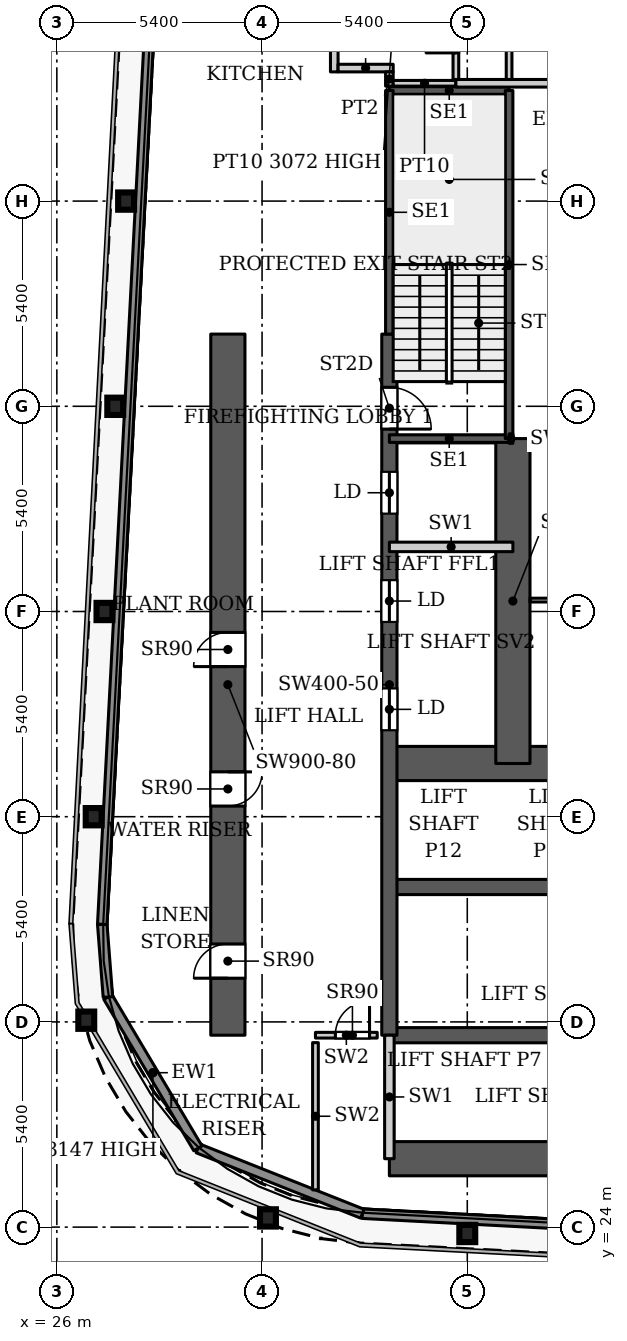
"""IFC4 building model, lengths in metres.
Left out: names, types, materials, properties, quantities, classifications, styles, units other than length and angle.
Written with IfcOpenShell. Run it as: python <this file> out.ifc"""

import sys

from ifc_helpers import new_model, si_unit, direction, frame, frame_2d, origin, origin_2d, place, context, subcontext, project, spatial, rectangle, i_section, extrude, source, transform, mapped, element, fill, save


model = new_model("IFC4")
c1 = context("Model", 3, precision=1e-05, world=origin(), true_north=direction((0.0, 1.0)))
c2 = subcontext(c1, "Body", "Model", "MODEL_VIEW")
j1 = project(units=[si_unit("LENGTHUNIT", "METRE"), si_unit("PLANEANGLEUNIT", "RADIAN")], contexts=[c1])
p1 = place(None, origin())
s1 = spatial("IfcSite", under=j1, at=p1, CompositionType="ELEMENT")
p2 = place(p1, origin())
s2 = spatial("IfcBuilding", under=s1, at=p2, CompositionType="ELEMENT")
p3 = place(p2, frame((0.0, 0.0, 94.1)))
s3 = spatial("IfcBuildingStorey", under=s2, at=p3, CompositionType="ELEMENT", Elevation=94.1)
for number, where, z_axis, x_axis in (
    (1, (36.8, 23.832, 0.0), (0.0, 0.0, 1.0), (1.0, 0.0, 0.0)),
    (2, (31.555, 24.242, 0.0), (0.0, 0.0, 1.0), (1.0, 0.0, 0.0)),
    (3, (26.774, 29.445, 0.0), (0.0, 0.0, 1.0), (1.0, 0.0, 0.0)),
    (4, (26.969, 34.8, 0.0), (0.0, 0.0, 1.0), (1.0, 0.0, 0.0)),
    (5, (27.253, 40.2, 0.0), (0.0, 0.0, 1.0), (1.0, 0.0, 0.0)),
    (6, (27.537, 45.6, 0.0), (0.0, 0.0, 1.0), (1.0, 0.0, 0.0)),
    (7, (27.822, 51.0, 0.0), (0.0, 0.0, 1.0), (1.0, 0.0, 0.0)),
):
    element("IfcColumn", number, at=place(p3, frame(where, z_axis=z_axis, x_axis=x_axis)), inside=s3, PredefinedType="COLUMN", context=c2, shape_type="SweptSolid", body=[
        extrude(i_section(OverallWidth=0.418, OverallDepth=0.455, WebThickness=0.042, FlangeThickness=0.068, FilletRadius=0.014, at=origin_2d()), origin(), (0.0, 0.0, 1.0), 3.9),
    ])
p4 = place(p3, frame((34.75, 25.8, 0.0), z_axis=(0.0, 0.0, 1.0), x_axis=(1.0, 0.0, 0.0)))
e8 = element("IfcWall", 8, at=p4, inside=s3, PredefinedType="SHEAR", context=c2, shape_type="SweptSolid", body=[
    extrude(rectangle(XDim=18.4, YDim=0.9, at=frame_2d((9.2, 0.0))), origin(), (0.0, 0.0, 1.0), 3.9),
])
p5 = place(p3, frame((34.75, 29.05, 0.0), z_axis=(0.0, 0.0, 1.0), x_axis=(1.0, 0.0, 0.0)))
e9 = element("IfcWall", 9, at=p5, inside=s3, PredefinedType="SHEAR", context=c2, shape_type="SweptSolid", body=[
    extrude(rectangle(XDim=18.4, YDim=0.4, at=frame_2d((9.2, 0.0))), origin(), (0.0, 0.0, 1.0), 3.9),
])
p6 = place(p5, frame((15.125, 0.0, 0.0)))
e10 = element("IfcOpeningElement", 10, at=p6, cuts=e9, PredefinedType="OPENING", context=c2, shape_type="SweptSolid", body=[
    extrude(rectangle(XDim=1.1, YDim=2.2, at=frame_2d((0.55, 1.1))), frame((0.0, 0.21, 0.0), z_axis=(0.0, -1.0, 0.0), x_axis=(1.0, 0.0, 0.0)), (0.0, 0.0, 1.0), 0.42),
])
p7 = place(p3, frame((34.75, 32.95, 0.0), z_axis=(0.0, 0.0, 1.0), x_axis=(1.0, 0.0, 0.0)))
e11 = element("IfcWall", 11, at=p7, inside=s3, PredefinedType="SHEAR", context=c2, shape_type="SweptSolid", body=[
    extrude(rectangle(XDim=14.25, YDim=0.4, at=frame_2d((7.125, 0.0))), origin(), (0.0, 0.0, 1.0), 3.9),
])
p8 = place(p3, frame((34.75, 36.2, 0.0), z_axis=(0.0, 0.0, 1.0), x_axis=(1.0, 0.0, 0.0)))
e12 = element("IfcWall", 12, at=p8, inside=s3, PredefinedType="SHEAR", context=c2, shape_type="SweptSolid", body=[
    extrude(rectangle(XDim=18.4, YDim=0.9, at=frame_2d((9.2, 0.0))), origin(), (0.0, 0.0, 1.0), 3.9),
])
p9 = place(p8, frame((16.9, 0.0, 0.0)))
e13 = element("IfcOpeningElement", 13, at=p9, cuts=e12, PredefinedType="OPENING", context=c2, shape_type="SweptSolid", body=[
    extrude(rectangle(XDim=1.0, YDim=2.2, at=frame_2d((0.5, 1.1))), frame((0.0, 0.46, 0.0), z_axis=(0.0, -1.0, 0.0), x_axis=(1.0, 0.0, 0.0)), (0.0, 0.0, 1.0), 0.92),
])
p10 = place(p3, frame((34.75, 29.05, 0.0), z_axis=(0.0, 0.0, 1.0), x_axis=(0.0, 1.0, 0.0)))
e14 = element("IfcWall", 14, at=p10, inside=s3, PredefinedType="SHEAR", context=c2, shape_type="SweptSolid", body=[
    extrude(rectangle(XDim=18.45, YDim=0.4, at=frame_2d((9.225, 0.0))), origin(), (0.0, 0.0, 1.0), 3.9),
])
p11 = place(p10, frame((8.025, 0.0, 0.0)))
e15 = element("IfcOpeningElement", 15, at=p11, cuts=e14, PredefinedType="OPENING", context=c2, shape_type="SweptSolid", body=[
    extrude(rectangle(XDim=1.1, YDim=2.2, at=frame_2d((0.55, 1.1))), frame((0.0, 0.21, 0.0), z_axis=(0.0, -1.0, 0.0), x_axis=(1.0, 0.0, 0.0)), (0.0, 0.0, 1.0), 0.42),
])
p12 = place(p10, frame((10.875, 0.0, 0.0)))
e16 = element("IfcOpeningElement", 16, at=p12, cuts=e14, PredefinedType="OPENING", context=c2, shape_type="SweptSolid", body=[
    extrude(rectangle(XDim=1.1, YDim=2.2, at=frame_2d((0.55, 1.1))), frame((0.0, 0.21, 0.0), z_axis=(0.0, -1.0, 0.0), x_axis=(1.0, 0.0, 0.0)), (0.0, 0.0, 1.0), 0.42),
])
p13 = place(p10, frame((13.725, 0.0, 0.0)))
e17 = element("IfcOpeningElement", 17, at=p13, cuts=e14, PredefinedType="OPENING", context=c2, shape_type="SweptSolid", body=[
    extrude(rectangle(XDim=1.1, YDim=2.2, at=frame_2d((0.55, 1.1))), frame((0.0, 0.21, 0.0), z_axis=(0.0, -1.0, 0.0), x_axis=(1.0, 0.0, 0.0)), (0.0, 0.0, 1.0), 0.42),
])
p14 = place(p10, frame((15.95, 0.0, 0.0)))
e18 = element("IfcOpeningElement", 18, at=p14, cuts=e14, PredefinedType="OPENING", context=c2, shape_type="SweptSolid", body=[
    extrude(rectangle(XDim=1.1, YDim=2.2, at=frame_2d((0.55, 1.1))), frame((0.0, 0.21, 0.0), z_axis=(0.0, -1.0, 0.0), x_axis=(1.0, 0.0, 0.0)), (0.0, 0.0, 1.0), 0.42),
])
p15 = place(p3, frame((38.0, 36.2, 0.0), z_axis=(0.0, 0.0, 1.0), x_axis=(0.0, 1.0, 0.0)))
e19 = element("IfcWall", 19, at=p15, inside=s3, PredefinedType="SHEAR", context=c2, shape_type="SweptSolid", body=[
    extrude(rectangle(XDim=8.55, YDim=0.9, at=frame_2d((4.275, 0.0))), origin(), (0.0, 0.0, 1.0), 3.9),
])
p16 = place(p3, frame((30.5, 29.05, 0.0), z_axis=(0.0, 0.0, 1.0), x_axis=(0.0, 1.0, 0.0)))
e20 = element("IfcWall", 20, at=p16, inside=s3, PredefinedType="SHEAR", context=c2, shape_type="SweptSolid", body=[
    extrude(rectangle(XDim=18.45, YDim=0.9, at=frame_2d((9.225, 0.0))), origin(), (0.0, 0.0, 1.0), 3.9),
])
p17 = place(p16, frame((1.5, 0.0, 0.0)))
e21 = element("IfcOpeningElement", 21, at=p17, cuts=e20, PredefinedType="OPENING", context=c2, shape_type="SweptSolid", body=[
    extrude(rectangle(XDim=0.9, YDim=2.2, at=frame_2d((0.45, 1.1))), frame((0.0, 0.46, 0.0), z_axis=(0.0, -1.0, 0.0), x_axis=(1.0, 0.0, 0.0)), (0.0, 0.0, 1.0), 0.92),
])
p18 = place(p16, frame((6.03, 0.0, 0.0)))
e22 = element("IfcOpeningElement", 22, at=p18, cuts=e20, PredefinedType="OPENING", context=c2, shape_type="SweptSolid", body=[
    extrude(rectangle(XDim=0.9, YDim=2.2, at=frame_2d((0.45, 1.1))), frame((0.0, 0.46, 0.0), z_axis=(0.0, -1.0, 0.0), x_axis=(1.0, 0.0, 0.0)), (0.0, 0.0, 1.0), 0.92),
])
p19 = place(p16, frame((9.7, 0.0, 0.0)))
e23 = element("IfcOpeningElement", 23, at=p19, cuts=e20, PredefinedType="OPENING", context=c2, shape_type="SweptSolid", body=[
    extrude(rectangle(XDim=0.9, YDim=2.2, at=frame_2d((0.45, 1.1))), frame((0.0, 0.46, 0.0), z_axis=(0.0, -1.0, 0.0), x_axis=(1.0, 0.0, 0.0)), (0.0, 0.0, 1.0), 0.92),
])
p20 = place(p3, frame((100.586, 20.85, 0.0), z_axis=(0.0, 0.0, 1.0), x_axis=(-0.99861746497, 0.052565755559, 0.0)))
e24 = element("IfcWall", 24, at=p20, inside=s3, PredefinedType="SOLIDWALL", context=c2, shape_type="SweptSolid", body=[
    extrude(rectangle(XDim=66.639, YDim=0.25, at=frame_2d((33.319, 0.0))), origin(), (0.0, 0.0, 1.0), 3.75),
])
p21 = place(p3, frame((34.039, 24.353, 0.0), z_axis=(0.0, 0.0, 1.0), x_axis=(-0.929352825399, 0.369192803184, 0.0)))
e25 = element("IfcWall", 25, at=p21, inside=s3, PredefinedType="SOLIDWALL", context=c2, shape_type="SweptSolid", body=[
    extrude(rectangle(XDim=4.656, YDim=0.25, at=frame_2d((2.328, 0.0))), origin(), (0.0, 0.0, 1.0), 3.75),
])
p22 = place(p3, frame((29.712, 26.072, 0.0), z_axis=(0.0, 0.0, 1.0), x_axis=(-0.511028049012, 0.859564036662, 0.0)))
e26 = element("IfcWall", 26, at=p22, inside=s3, PredefinedType="SOLIDWALL", context=c2, shape_type="SweptSolid", body=[
    extrude(rectangle(XDim=4.634, YDim=0.25, at=frame_2d((2.317, 0.0))), origin(), (0.0, 0.0, 1.0), 3.147),
])
p23 = place(p3, frame((27.344, 30.055, 0.0), z_axis=(0.0, 0.0, 1.0), x_axis=(-0.077571675317, 0.99698677784, 0.0)))
e27 = element("IfcWall", 27, at=p23, inside=s3, PredefinedType="SOLIDWALL", context=c2, shape_type="SweptSolid", body=[
    extrude(rectangle(XDim=1.92, YDim=0.25, at=frame_2d((0.96, 0.0))), origin(), (0.0, 0.0, 1.0), 3.75),
])
p24 = place(p3, frame((27.195, 31.969, 0.0), z_axis=(0.0, 0.0, 1.0), x_axis=(0.052559748861, 0.998617781135, 0.0)))
e28 = element("IfcWall", 28, at=p24, inside=s3, PredefinedType="SOLIDWALL", context=c2, shape_type="SweptSolid", body=[
    extrude(rectangle(XDim=55.972, YDim=0.25, at=frame_2d((27.986, 0.0))), origin(), (0.0, 0.0, 1.0), 3.75),
])
for number, where, z_axis, x_axis in (
    (29, (34.75, 44.75, 0.0), (0.0, 0.0, 1.0), (1.0, 0.0, 0.0)),
    (30, (34.75, 53.91, 0.0), (0.0, 0.0, 1.0), (1.0, 0.0, 0.0)),
):
    element("IfcWall", number, at=place(p3, frame(where, z_axis=z_axis, x_axis=x_axis)), inside=s3, PredefinedType="SHEAR", context=c2, shape_type="SweptSolid", body=[
        extrude(rectangle(XDim=3.15, YDim=0.2, at=frame_2d((1.575, 0.0))), origin(), (0.0, 0.0, 1.0), 3.9),
    ])
p25 = place(p3, frame((34.75, 47.5, 0.0), z_axis=(0.0, 0.0, 1.0), x_axis=(0.0, 1.0, 0.0)))
e31 = element("IfcWall", 31, at=p25, inside=s3, PredefinedType="SHEAR", context=c2, shape_type="SweptSolid", body=[
    extrude(rectangle(XDim=6.41, YDim=0.2, at=frame_2d((3.205, 0.0))), origin(), (0.0, 0.0, 1.0), 3.9),
])
p26 = place(p3, frame((37.9, 44.75, 0.0), z_axis=(0.0, 0.0, 1.0), x_axis=(0.0, 1.0, 0.0)))
e32 = element("IfcWall", 32, at=p26, inside=s3, PredefinedType="SHEAR", context=c2, shape_type="SweptSolid", body=[
    extrude(rectangle(XDim=9.16, YDim=0.2, at=frame_2d((4.58, 0.0))), origin(), (0.0, 0.0, 1.0), 3.9),
])
for number, where, z_axis, x_axis in (
    (33, (34.75, 25.8, 0.0), (0.0, 0.0, 1.0), (0.0, 1.0, 0.0)),
    (34, (34.75, 41.9, 0.0), (0.0, 0.0, 1.0), (1.0, 0.0, 0.0)),
):
    element("IfcWall", number, at=place(p3, frame(where, z_axis=z_axis, x_axis=x_axis)), inside=s3, PredefinedType="PARTITIONING", context=c2, shape_type="SweptSolid", body=[
        extrude(rectangle(XDim=3.25, YDim=0.25, at=frame_2d((1.625, 0.0))), origin(), (0.0, 0.0, 1.0), 3.9),
    ])
p27 = place(p3, frame((37.9, 44.75, 0.0), z_axis=(0.0, 0.0, 1.0), x_axis=(1.0, 0.0, 0.0)))
e35 = element("IfcWall", 35, at=p27, inside=s3, PredefinedType="PARTITIONING", context=c2, shape_type="SweptSolid", body=[
    extrude(rectangle(XDim=0.1, YDim=0.25, at=frame_2d((0.05, 0.0))), origin(), (0.0, 0.0, 1.0), 3.9),
])
p28 = place(p3, frame((32.805, 29.05, 0.0), z_axis=(0.0, 0.0, 1.0), x_axis=(1.0, 0.0, 0.0)))
e36 = element("IfcWall", 36, at=p28, inside=s3, PredefinedType="PARTITIONING", context=c2, shape_type="SweptSolid", body=[
    extrude(rectangle(XDim=1.625, YDim=0.15, at=frame_2d((0.812, 0.0))), origin(), (0.0, 0.0, 1.0), 3.9),
])
p29 = place(p28, frame((0.523, 0.0, 0.0)))
e37 = element("IfcOpeningElement", 37, at=p29, cuts=e36, PredefinedType="OPENING", context=c2, shape_type="SweptSolid", body=[
    extrude(rectangle(XDim=0.9, YDim=2.2, at=frame_2d((0.45, 1.1))), frame((0.0, 0.085, 0.0), z_axis=(0.0, -1.0, 0.0), x_axis=(1.0, 0.0, 0.0)), (0.0, 0.0, 1.0), 0.17),
])
p30 = place(p3, frame((32.805, 24.98, 0.0), z_axis=(0.0, 0.0, 1.0), x_axis=(0.0, 1.0, 0.0)))
e38 = element("IfcWall", 38, at=p30, inside=s3, PredefinedType="PARTITIONING", context=c2, shape_type="SweptSolid", body=[
    extrude(rectangle(XDim=3.875, YDim=0.15, at=frame_2d((1.938, 0.0))), origin(), (0.0, 0.0, 1.0), 3.9),
])
p31 = place(p3, frame((33.3, 54.4, 0.0), z_axis=(0.0, 0.0, 1.0), x_axis=(0.0, 1.0, 0.0)))
e39 = element("IfcWall", 39, at=p31, inside=s3, PredefinedType="PARTITIONING", context=c2, shape_type="SweptSolid", body=[
    extrude(rectangle(XDim=24.95, YDim=0.2, at=frame_2d((12.475, 0.0))), origin(), (0.0, 0.0, 1.0), 3.6),
])
p32 = place(p31, frame((5.5, 0.0, 0.0)))
e40 = element("IfcOpeningElement", 40, at=p32, cuts=e39, PredefinedType="OPENING", context=c2, shape_type="SweptSolid", body=[
    extrude(rectangle(XDim=1.0, YDim=2.1, at=frame_2d((0.5, 1.05))), frame((0.0, 0.11, 0.0), z_axis=(0.0, -1.0, 0.0), x_axis=(1.0, 0.0, 0.0)), (0.0, 0.0, 1.0), 0.22),
])
p33 = place(p31, frame((22.3, 0.0, 0.0)))
e41 = element("IfcOpeningElement", 41, at=p33, cuts=e39, PredefinedType="OPENING", context=c2, shape_type="SweptSolid", body=[
    extrude(rectangle(XDim=1.0, YDim=2.1, at=frame_2d((0.5, 1.05))), frame((0.0, 0.11, 0.0), z_axis=(0.0, -1.0, 0.0), x_axis=(1.0, 0.0, 0.0)), (0.0, 0.0, 1.0), 0.22),
])
p34 = place(p3, frame((33.4, 54.5, 0.0), z_axis=(0.0, 0.0, 1.0), x_axis=(1.0, 0.0, 0.0)))
e42 = element("IfcWall", 42, at=p34, inside=s3, PredefinedType="PARTITIONING", context=c2, shape_type="SweptSolid", body=[
    extrude(rectangle(XDim=1.45, YDim=0.2, at=frame_2d((0.725, 0.0))), origin(), (0.0, 0.0, 1.0), 3.6),
])
p35 = place(p3, frame((34.75, 54.025, 0.0), z_axis=(0.0, 0.0, 1.0), x_axis=(0.0, 1.0, 0.0)))
e43 = element("IfcWall", 43, at=p35, inside=s3, PredefinedType="PARTITIONING", context=c2, shape_type="SweptSolid", body=[
    extrude(rectangle(XDim=0.375, YDim=0.2, at=frame_2d((0.188, 0.0))), origin(), (0.0, 0.0, 1.0), 3.6),
])
p36 = place(p3, frame((34.85, 54.1, 0.0), z_axis=(0.0, 0.0, 1.0), x_axis=(1.0, 0.0, 0.0)))
e44 = element("IfcWall", 44, at=p36, inside=s3, PredefinedType="PARTITIONING", context=c2, shape_type="SweptSolid", body=[
    extrude(rectangle(XDim=1.65, YDim=0.15, at=frame_2d((0.825, 0.0))), origin(), (0.0, 0.0, 1.0), 3.6),
])
p37 = place(p3, frame((36.5, 54.1, 0.0), z_axis=(0.0, 0.0, 1.0), x_axis=(1.0, 0.0, 0.0)))
e45 = element("IfcWall", 45, at=p37, inside=s3, PredefinedType="PARTITIONING", context=c2, shape_type="SweptSolid", body=[
    extrude(rectangle(XDim=9.4, YDim=0.2, at=frame_2d((4.7, 0.0))), origin(), (0.0, 0.0, 1.0), 3.6),
])
p38 = place(p3, frame((36.5, 54.2, 0.0), z_axis=(0.0, 0.0, 1.0), x_axis=(0.0, 1.0, 0.0)))
e46 = element("IfcWall", 46, at=p38, inside=s3, PredefinedType="PARTITIONING", context=c2, shape_type="SweptSolid", body=[
    extrude(rectangle(XDim=5.35, YDim=0.15, at=frame_2d((2.675, 0.0))), origin(), (0.0, 0.0, 1.0), 3.6),
])
p39 = place(p38, frame((0.7, 0.0, 0.0)))
e47 = element("IfcOpeningElement", 47, at=p39, cuts=e46, PredefinedType="OPENING", context=c2, shape_type="SweptSolid", body=[
    extrude(rectangle(XDim=0.8, YDim=2.1, at=frame_2d((0.4, 1.05))), frame((0.0, 0.085, 0.0), z_axis=(0.0, -1.0, 0.0), x_axis=(1.0, 0.0, 0.0)), (0.0, 0.0, 1.0), 0.17),
])
p40 = place(p38, frame((3.35, 0.0, 0.0)))
e48 = element("IfcOpeningElement", 48, at=p40, cuts=e46, PredefinedType="OPENING", context=c2, shape_type="SweptSolid", body=[
    extrude(rectangle(XDim=0.9, YDim=2.1, at=frame_2d((0.45, 1.05))), frame((0.0, 0.085, 0.0), z_axis=(0.0, -1.0, 0.0), x_axis=(1.0, 0.0, 0.0)), (0.0, 0.0, 1.0), 0.17),
])
p41 = place(p3, frame((37.9, 54.2, 0.0), z_axis=(0.0, 0.0, 1.0), x_axis=(0.0, 1.0, 0.0)))
e49 = element("IfcWall", 49, at=p41, inside=s3, PredefinedType="PARTITIONING", context=c2, shape_type="SweptSolid", body=[
    extrude(rectangle(XDim=8.5, YDim=0.15, at=frame_2d((4.25, 0.0))), origin(), (0.0, 0.0, 1.0), 3.6),
])
p42 = place(p41, frame((1.1, 0.0, 0.0)))
e50 = element("IfcOpeningElement", 50, at=p42, cuts=e49, PredefinedType="OPENING", context=c2, shape_type="SweptSolid", body=[
    extrude(rectangle(XDim=0.9, YDim=2.1, at=frame_2d((0.45, 1.05))), frame((0.0, 0.085, 0.0), z_axis=(0.0, -1.0, 0.0), x_axis=(1.0, 0.0, 0.0)), (0.0, 0.0, 1.0), 0.17),
])
p43 = place(p41, frame((5.4, 0.0, 0.0)))
e51 = element("IfcOpeningElement", 51, at=p43, cuts=e49, PredefinedType="OPENING", context=c2, shape_type="SweptSolid", body=[
    extrude(rectangle(XDim=1.0, YDim=2.1, at=frame_2d((0.5, 1.05))), frame((0.0, 0.085, 0.0), z_axis=(0.0, -1.0, 0.0), x_axis=(1.0, 0.0, 0.0)), (0.0, 0.0, 1.0), 0.17),
])
p44 = place(p3, frame((38.449, 40.5, 0.0), z_axis=(0.0, 0.0, 1.0), x_axis=(1.0, 0.0, 0.0)))
e52 = element("IfcWall", 52, at=p44, inside=s3, PredefinedType="PARTITIONING", context=c2, shape_type="SweptSolid", body=[
    extrude(rectangle(XDim=14.851, YDim=0.1, at=frame_2d((7.426, 0.0))), origin(), (0.0, 0.0, 1.0), 3.6),
])
p45 = place(p44, frame((6.751, 0.0, 0.0)))
e53 = element("IfcOpeningElement", 53, at=p45, cuts=e52, PredefinedType="OPENING", context=c2, shape_type="SweptSolid", body=[
    extrude(rectangle(XDim=1.0, YDim=2.1, at=frame_2d((0.5, 1.05))), frame((0.0, 0.06, 0.0), z_axis=(0.0, -1.0, 0.0), x_axis=(1.0, 0.0, 0.0)), (0.0, 0.0, 1.0), 0.12),
])
m1 = source(origin(), c2, "Body", "SweptSolid", [
    extrude(rectangle(XDim=1.1, YDim=2.2, at=frame_2d((0.55, 1.1))), frame((0.0, 0.025, 0.0), z_axis=(0.0, -1.0, 0.0), x_axis=(1.0, 0.0, 0.0)), (0.0, 0.0, 1.0), 0.05),
])
p46 = place(p11, origin())
e54 = element("IfcDoor", 54, at=p46, inside=s3, OperationType="SLIDING_TO_LEFT", PredefinedType="DOOR", context=c2, shape_type="MappedRepresentation", body=[
    mapped(m1, transform((0.0, 0.0, 0.0), x_axis=(1.0, 0.0, 0.0), y_axis=(0.0, 1.0, 0.0), z_axis=(0.0, 0.0, 1.0), scale=1.0)),
])
fill(e15, e54)
p47 = place(p12, origin())
e55 = element("IfcDoor", 55, at=p47, inside=s3, OperationType="SLIDING_TO_LEFT", PredefinedType="DOOR", context=c2, shape_type="MappedRepresentation", body=[
    mapped(m1, transform((0.0, 0.0, 0.0), x_axis=(1.0, 0.0, 0.0), y_axis=(0.0, 1.0, 0.0), z_axis=(0.0, 0.0, 1.0), scale=1.0)),
])
fill(e16, e55)
p48 = place(p13, origin())
e56 = element("IfcDoor", 56, at=p48, inside=s3, OperationType="SLIDING_TO_LEFT", PredefinedType="DOOR", context=c2, shape_type="MappedRepresentation", body=[
    mapped(m1, transform((0.0, 0.0, 0.0), x_axis=(1.0, 0.0, 0.0), y_axis=(0.0, 1.0, 0.0), z_axis=(0.0, 0.0, 1.0), scale=1.0)),
])
fill(e17, e56)
m2 = source(origin(), c2, "Body", "SweptSolid", [
    extrude(rectangle(XDim=0.9, YDim=2.2, at=frame_2d((0.45, 1.1))), frame((0.0, 0.025, 0.0), z_axis=(0.0, -1.0, 0.0), x_axis=(1.0, 0.0, 0.0)), (0.0, 0.0, 1.0), 0.05),
])
p49 = place(p17, origin())
e57 = element("IfcDoor", 57, at=p49, inside=s3, OperationType="SINGLE_SWING_LEFT", PredefinedType="DOOR", context=c2, shape_type="MappedRepresentation", body=[
    mapped(m2, transform((0.0, 0.0, 0.0), x_axis=(1.0, 0.0, 0.0), y_axis=(0.0, 1.0, 0.0), z_axis=(0.0, 0.0, 1.0), scale=1.0)),
])
fill(e21, e57)
p50 = place(p18, origin())
e58 = element("IfcDoor", 58, at=p50, inside=s3, OperationType="SINGLE_SWING_RIGHT", PredefinedType="DOOR", context=c2, shape_type="MappedRepresentation", body=[
    mapped(m2, transform((0.0, 0.0, 0.0), x_axis=(1.0, 0.0, 0.0), y_axis=(0.0, 1.0, 0.0), z_axis=(0.0, 0.0, 1.0), scale=1.0)),
])
fill(e22, e58)
p51 = place(p19, origin())
e59 = element("IfcDoor", 59, at=p51, inside=s3, OperationType="SINGLE_SWING_LEFT", PredefinedType="DOOR", context=c2, shape_type="MappedRepresentation", body=[
    mapped(m2, transform((0.0, 0.0, 0.0), x_axis=(1.0, 0.0, 0.0), y_axis=(0.0, 1.0, 0.0), z_axis=(0.0, 0.0, 1.0), scale=1.0)),
])
fill(e23, e59)
p52 = place(p29, origin())
e60 = element("IfcDoor", 60, at=p52, inside=s3, OperationType="SINGLE_SWING_LEFT", PredefinedType="DOOR", context=c2, shape_type="MappedRepresentation", body=[
    mapped(m2, transform((0.0, 0.0, 0.0), x_axis=(1.0, 0.0, 0.0), y_axis=(0.0, 1.0, 0.0), z_axis=(0.0, 0.0, 1.0), scale=1.0)),
])
fill(e37, e60)
m3 = source(origin(), c2, "Body", "SweptSolid", [
    extrude(rectangle(XDim=1.1, YDim=2.2, at=frame_2d((0.55, 1.1))), frame((0.0, 0.025, 0.0), z_axis=(0.0, -1.0, 0.0), x_axis=(1.0, 0.0, 0.0)), (0.0, 0.0, 1.0), 0.05),
])
p53 = place(p14, origin())
e61 = element("IfcDoor", 61, at=p53, inside=s3, OperationType="SINGLE_SWING_RIGHT", PredefinedType="DOOR", context=c2, shape_type="MappedRepresentation", body=[
    mapped(m3, transform((0.0, 0.0, 0.0), x_axis=(1.0, 0.0, 0.0), y_axis=(0.0, 1.0, 0.0), z_axis=(0.0, 0.0, 1.0), scale=1.0)),
])
fill(e18, e61)
m4 = source(origin(), c2, "Body", "SweptSolid", [
    extrude(rectangle(XDim=0.8, YDim=2.1, at=frame_2d((0.4, 1.05))), frame((0.0, 0.025, 0.0), z_axis=(0.0, -1.0, 0.0), x_axis=(1.0, 0.0, 0.0)), (0.0, 0.0, 1.0), 0.05),
])
p54 = place(p39, origin())
e62 = element("IfcDoor", 62, at=p54, inside=s3, OperationType="SINGLE_SWING_LEFT", PredefinedType="DOOR", context=c2, shape_type="MappedRepresentation", body=[
    mapped(m4, transform((0.0, 0.0, 0.0), x_axis=(1.0, 0.0, 0.0), y_axis=(0.0, 1.0, 0.0), z_axis=(0.0, 0.0, 1.0), scale=1.0)),
])
fill(e47, e62)
save(model, sys.argv[1])
